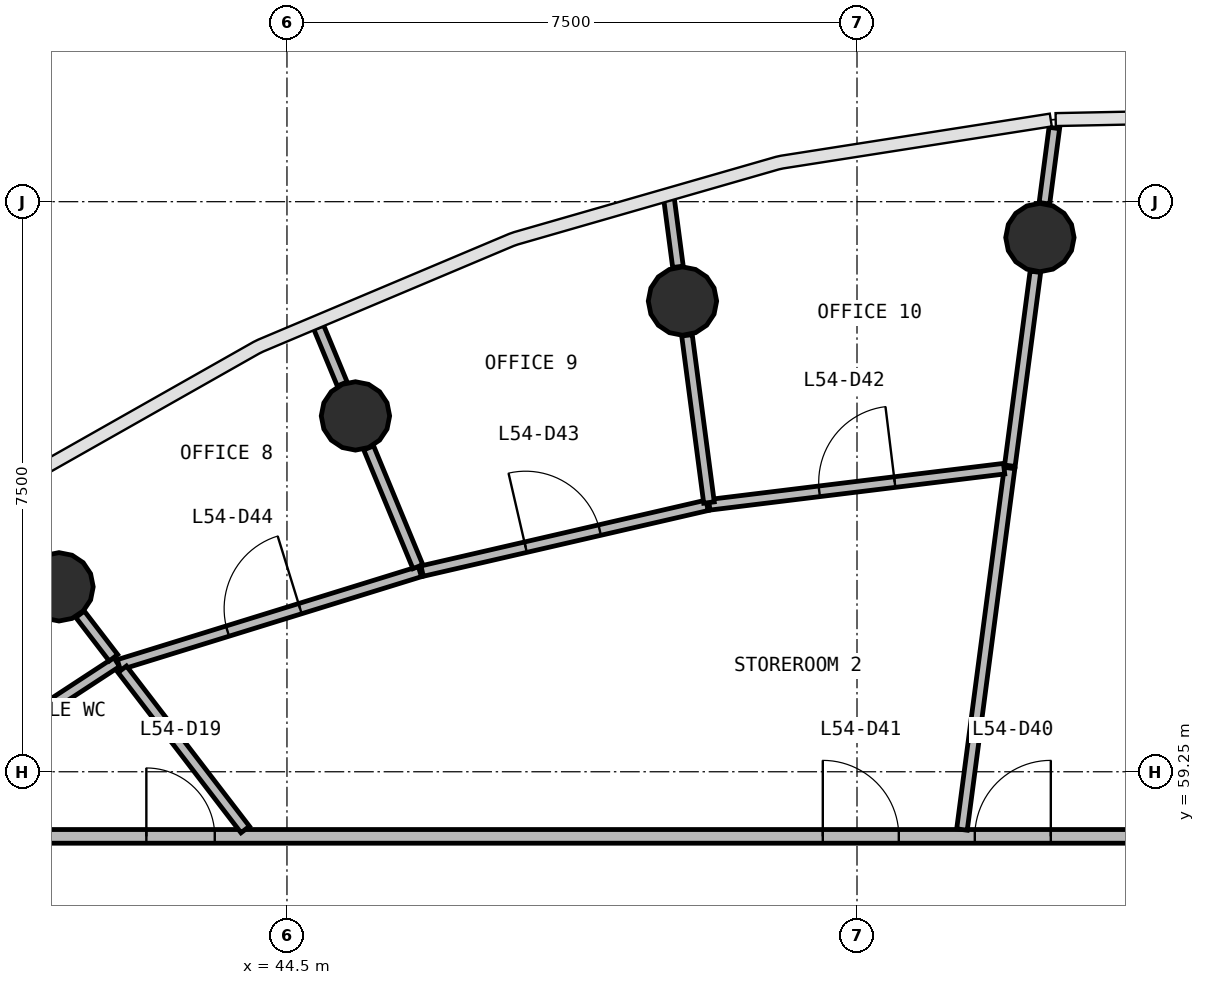
"""IFC4 building model, lengths in metres.
Left out: names, types, materials, properties, quantities, classifications, styles, units other than length and angle.
Written with IfcOpenShell. Run it as: python <this file> out.ifc"""

import sys

from ifc_helpers import new_model, si_unit, direction, frame, frame_2d, origin, origin_2d, place, context, subcontext, project, spatial, rectangle, circle, extrude, source, transform, mapped, element, fill, save


model = new_model("IFC4")
c1 = context("Model", 3, precision=1e-05, world=origin(), true_north=direction((0.0, 1.0)))
c2 = subcontext(c1, "Body", "Model", "MODEL_VIEW")
j1 = project(units=[si_unit("LENGTHUNIT", "METRE"), si_unit("PLANEANGLEUNIT", "RADIAN")], contexts=[c1])
p1 = place(None, origin())
s1 = spatial("IfcSite", under=j1, at=p1, CompositionType="ELEMENT")
p2 = place(p1, origin())
s2 = spatial("IfcBuilding", under=s1, at=p2, CompositionType="ELEMENT")
p3 = place(p2, frame((0.0, 0.0, 222.8)))
s3 = spatial("IfcBuildingStorey", under=s2, at=p3, CompositionType="ELEMENT", Elevation=222.8)
m1 = source(origin(), c2, "Body", "SweptSolid", [
    extrude(circle(Radius=0.45, at=origin_2d()), origin(), (0.0, 0.0, 1.0), 3.9),
])
for number, where, z_axis, x_axis in (
    (1, (54.406, 66.278, 0.0), (0.0, 0.0, 1.0), (1.0, 0.0, 0.0)),
    (2, (49.704, 65.442, 0.0), (0.0, 0.0, 1.0), (1.0, 0.0, 0.0)),
    (3, (45.401, 63.931, 0.0), (0.0, 0.0, 1.0), (1.0, 0.0, 0.0)),
    (4, (41.501, 61.683, 0.0), (0.0, 0.0, 1.0), (1.0, 0.0, 0.0)),
):
    element("IfcColumn", number, at=place(p3, frame(where, z_axis=z_axis, x_axis=x_axis)), inside=s3, PredefinedType="COLUMN", context=c2, shape_type="MappedRepresentation", body=[
        mapped(m1, transform((0.0, 0.0, 0.0), scale=1.0)),
    ])
p4 = place(p3, frame((40.6, 58.4, 0.0), z_axis=(0.0, 0.0, 1.0), x_axis=(1.0, 0.0, 0.0)))
e5 = element("IfcWall", 5, at=p4, inside=s3, PredefinedType="PARTITIONING", context=c2, shape_type="SweptSolid", body=[
    extrude(rectangle(XDim=22.8, YDim=0.18, at=frame_2d((11.4, 0.0))), origin(), (0.0, 0.0, 1.0), 2.88),
])
p5 = place(p4, frame((2.05, 0.0, 0.0)))
e6 = element("IfcOpeningElement", 6, at=p5, cuts=e5, PredefinedType="OPENING", context=c2, shape_type="SweptSolid", body=[
    extrude(rectangle(XDim=0.9, YDim=2.1, at=frame_2d((0.45, 1.05))), frame((0.0, 0.1, 0.0), z_axis=(0.0, -1.0, 0.0), x_axis=(1.0, 0.0, 0.0)), (0.0, 0.0, 1.0), 0.2),
])
p6 = place(p4, frame((12.95, 0.0, 0.0)))
e7 = element("IfcOpeningElement", 7, at=p6, cuts=e5, PredefinedType="OPENING", context=c2, shape_type="SweptSolid", body=[
    extrude(rectangle(XDim=1.0, YDim=2.1, at=frame_2d((0.5, 1.05))), frame((0.0, 0.1, 0.0), z_axis=(0.0, -1.0, 0.0), x_axis=(1.0, 0.0, 0.0)), (0.0, 0.0, 1.0), 0.2),
])
p7 = place(p4, frame((10.95, 0.0, 0.0)))
e8 = element("IfcOpeningElement", 8, at=p7, cuts=e5, PredefinedType="OPENING", context=c2, shape_type="SweptSolid", body=[
    extrude(rectangle(XDim=1.0, YDim=2.1, at=frame_2d((0.5, 1.05))), frame((0.0, 0.1, 0.0), z_axis=(0.0, -1.0, 0.0), x_axis=(1.0, 0.0, 0.0)), (0.0, 0.0, 1.0), 0.2),
])
p8 = place(p3, frame((53.381, 58.49, 0.0), z_axis=(0.0, 0.0, 1.0), x_axis=(0.130490058015, 0.991449617862, 0.0)))
e9 = element("IfcWall", 9, at=p8, inside=s3, PredefinedType="PARTITIONING", context=c2, shape_type="SweptSolid", body=[
    extrude(rectangle(XDim=4.797, YDim=0.14, at=frame_2d((2.398, 0.0))), origin(), (0.0, 0.0, 1.0), 2.88),
])
p9 = place(p3, frame((42.26, 60.694, 0.0), z_axis=(0.0, 0.0, 1.0), x_axis=(-0.836812752169, -0.547489194238, 0.0)))
e10 = element("IfcWall", 10, at=p9, inside=s3, PredefinedType="PARTITIONING", context=c2, shape_type="SweptSolid", body=[
    extrude(rectangle(XDim=4.388, YDim=0.14, at=frame_2d((2.194, 0.0))), origin(), (0.0, 0.0, 1.0), 2.88),
])
p10 = place(p3, frame((42.287, 60.658, 0.0), z_axis=(0.0, 0.0, 1.0), x_axis=(0.955334971009, 0.295525114276, 0.0)))
e11 = element("IfcWall", 11, at=p10, inside=s3, PredefinedType="PARTITIONING", context=c2, shape_type="SweptSolid", body=[
    extrude(rectangle(XDim=4.147, YDim=0.14, at=frame_2d((2.074, 0.0))), origin(), (0.0, 0.0, 1.0), 2.88),
])
p11 = place(p10, frame((1.497, 0.0, 0.0)))
e12 = element("IfcOpeningElement", 12, at=p11, cuts=e11, PredefinedType="OPENING", context=c2, shape_type="SweptSolid", body=[
    extrude(rectangle(XDim=1.0, YDim=2.1, at=frame_2d((0.5, 1.05))), frame((0.0, 0.08, 0.0), z_axis=(0.0, -1.0, 0.0), x_axis=(1.0, 0.0, 0.0)), (0.0, 0.0, 1.0), 0.16),
])
p12 = place(p3, frame((50.056, 62.762, 0.0), z_axis=(0.0, 0.0, 1.0), x_axis=(0.99258238902, 0.121573850015, 0.0)))
e13 = element("IfcWall", 13, at=p12, inside=s3, PredefinedType="PARTITIONING", context=c2, shape_type="SweptSolid", body=[
    extrude(rectangle(XDim=3.908, YDim=0.14, at=frame_2d((1.954, 0.0))), origin(), (0.0, 0.0, 1.0), 2.88),
])
p13 = place(p12, frame((1.458, 0.0, 0.0)))
e14 = element("IfcOpeningElement", 14, at=p13, cuts=e13, PredefinedType="OPENING", context=c2, shape_type="SweptSolid", body=[
    extrude(rectangle(XDim=1.0, YDim=2.1, at=frame_2d((0.5, 1.05))), frame((0.0, 0.08, 0.0), z_axis=(0.0, -1.0, 0.0), x_axis=(1.0, 0.0, 0.0)), (0.0, 0.0, 1.0), 0.16),
])
p14 = place(p3, frame((46.279, 61.89, 0.0), z_axis=(0.0, 0.0, 1.0), x_axis=(0.974383708643, 0.224891948123, 0.0)))
e15 = element("IfcWall", 15, at=p14, inside=s3, PredefinedType="PARTITIONING", context=c2, shape_type="SweptSolid", body=[
    extrude(rectangle(XDim=3.847, YDim=0.14, at=frame_2d((1.924, 0.0))), origin(), (0.0, 0.0, 1.0), 2.88),
])
p15 = place(p14, frame((1.397, 0.0, 0.0)))
e16 = element("IfcOpeningElement", 16, at=p15, cuts=e15, PredefinedType="OPENING", context=c2, shape_type="SweptSolid", body=[
    extrude(rectangle(XDim=1.0, YDim=2.1, at=frame_2d((0.5, 1.05))), frame((0.0, 0.08, 0.0), z_axis=(0.0, -1.0, 0.0), x_axis=(1.0, 0.0, 0.0)), (0.0, 0.0, 1.0), 0.16),
])
p16 = place(p3, frame((43.951, 58.49, 0.0), z_axis=(0.0, 0.0, 1.0), x_axis=(-0.608724660366, 0.793381552509, 0.0)))
e17 = element("IfcWall", 17, at=p16, inside=s3, PredefinedType="PARTITIONING", context=c2, shape_type="SweptSolid", body=[
    extrude(rectangle(XDim=2.657, YDim=0.14, at=frame_2d((1.329, 0.0))), origin(), (0.0, 0.0, 1.0), 2.88),
])
p17 = place(p3, frame((54.011, 63.276, 0.0), z_axis=(0.0, 0.0, 1.0), x_axis=(0.130616456633, 0.991432973658, 0.0)))
e18 = element("IfcWall", 18, at=p17, inside=s3, PredefinedType="PARTITIONING", context=c2, shape_type="SweptSolid", body=[
    extrude(rectangle(XDim=2.574, YDim=0.14, at=frame_2d((1.287, 0.0))), origin(), (0.0, 0.0, 1.0), 2.88),
])
p18 = place(p3, frame((50.052, 62.792, 0.0), z_axis=(0.0, 0.0, 1.0), x_axis=(-0.130477279337, 0.99145129965, 0.0)))
e19 = element("IfcWall", 19, at=p18, inside=s3, PredefinedType="PARTITIONING", context=c2, shape_type="SweptSolid", body=[
    extrude(rectangle(XDim=2.219, YDim=0.14, at=frame_2d((1.11, 0.0))), origin(), (0.0, 0.0, 1.0), 2.88),
])
p19 = place(p3, frame((46.222, 61.948, 0.0), z_axis=(0.0, 0.0, 1.0), x_axis=(-0.382636491463, 0.923898974672, 0.0)))
e20 = element("IfcWall", 20, at=p19, inside=s3, PredefinedType="PARTITIONING", context=c2, shape_type="SweptSolid", body=[
    extrude(rectangle(XDim=1.691, YDim=0.14, at=frame_2d((0.846, 0.0))), origin(), (0.0, 0.0, 1.0), 2.88),
])
p20 = place(p3, frame((54.466, 66.729, 0.0), z_axis=(0.0, 0.0, 1.0), x_axis=(0.130498763634, 0.99144847203, 0.0)))
e21 = element("IfcWall", 21, at=p20, inside=s3, PredefinedType="PARTITIONING", context=c2, shape_type="SweptSolid", body=[
    extrude(rectangle(XDim=0.999, YDim=0.14, at=frame_2d((0.5, 0.0))), origin(), (0.0, 0.0, 1.0), 2.88),
])
p21 = place(p3, frame((49.644, 65.893, 0.0), z_axis=(0.0, 0.0, 1.0), x_axis=(-0.130552399509, 0.991441410766, 0.0)))
e22 = element("IfcWall", 22, at=p21, inside=s3, PredefinedType="PARTITIONING", context=c2, shape_type="SweptSolid", body=[
    extrude(rectangle(XDim=0.903, YDim=0.14, at=frame_2d((0.452, 0.0))), origin(), (0.0, 0.0, 1.0), 2.88),
])
p22 = place(p3, frame((45.227, 64.352, 0.0), z_axis=(0.0, 0.0, 1.0), x_axis=(-0.382556243331, 0.923932205678, 0.0)))
e23 = element("IfcWall", 23, at=p22, inside=s3, PredefinedType="PARTITIONING", context=c2, shape_type="SweptSolid", body=[
    extrude(rectangle(XDim=0.809, YDim=0.14, at=frame_2d((0.404, 0.0))), origin(), (0.0, 0.0, 1.0), 2.88),
])
p23 = place(p3, frame((42.217, 60.749, 0.0), z_axis=(0.0, 0.0, 1.0), x_axis=(-0.608615982895, 0.79346492384, 0.0)))
e24 = element("IfcWall", 24, at=p23, inside=s3, PredefinedType="PARTITIONING", context=c2, shape_type="SweptSolid", body=[
    extrude(rectangle(XDim=0.722, YDim=0.14, at=frame_2d((0.361, 0.0))), origin(), (0.0, 0.0, 1.0), 2.88),
])
m2 = source(origin(), c2, "Body", "SweptSolid", [
    extrude(rectangle(XDim=0.9, YDim=2.1, at=frame_2d((0.45, 1.05))), frame((0.0, 0.025, 0.0), z_axis=(0.0, -1.0, 0.0), x_axis=(1.0, 0.0, 0.0)), (0.0, 0.0, 1.0), 0.05),
])
p24 = place(p5, origin())
e25 = element("IfcDoor", 25, at=p24, inside=s3, OperationType="SINGLE_SWING_LEFT", PredefinedType="DOOR", context=c2, shape_type="MappedRepresentation", body=[
    mapped(m2, transform((0.0, 0.0, 0.0), scale=1.0)),
])
fill(e6, e25)
m3 = source(origin(), c2, "Body", "SweptSolid", [
    extrude(rectangle(XDim=1.0, YDim=2.1, at=frame_2d((0.5, 1.05))), frame((0.0, 0.025, 0.0), z_axis=(0.0, -1.0, 0.0), x_axis=(1.0, 0.0, 0.0)), (0.0, 0.0, 1.0), 0.05),
])
p25 = place(p6, origin())
e26 = element("IfcDoor", 26, at=p25, inside=s3, OperationType="SINGLE_SWING_RIGHT", PredefinedType="DOOR", context=c2, shape_type="MappedRepresentation", body=[
    mapped(m3, transform((0.0, 0.0, 0.0), scale=1.0)),
])
fill(e7, e26)
p26 = place(p7, origin())
e27 = element("IfcDoor", 27, at=p26, inside=s3, OperationType="SINGLE_SWING_LEFT", PredefinedType="DOOR", context=c2, shape_type="MappedRepresentation", body=[
    mapped(m3, transform((0.0, 0.0, 0.0), scale=1.0)),
])
fill(e8, e27)
p27 = place(p13, origin())
e28 = element("IfcDoor", 28, at=p27, inside=s3, OperationType="SINGLE_SWING_RIGHT", PredefinedType="DOOR", context=c2, shape_type="MappedRepresentation", body=[
    mapped(m3, transform((0.0, 0.0, 0.0), scale=1.0)),
])
fill(e14, e28)
p28 = place(p15, origin())
e29 = element("IfcDoor", 29, at=p28, inside=s3, OperationType="SINGLE_SWING_LEFT", PredefinedType="DOOR", context=c2, shape_type="MappedRepresentation", body=[
    mapped(m3, transform((0.0, 0.0, 0.0), scale=1.0)),
])
fill(e16, e29)
p29 = place(p11, origin())
e30 = element("IfcDoor", 30, at=p29, inside=s3, OperationType="SINGLE_SWING_RIGHT", PredefinedType="DOOR", context=c2, shape_type="MappedRepresentation", body=[
    mapped(m3, transform((0.0, 0.0, 0.0), scale=1.0)),
])
fill(e12, e30)
save(model, sys.argv[1])
